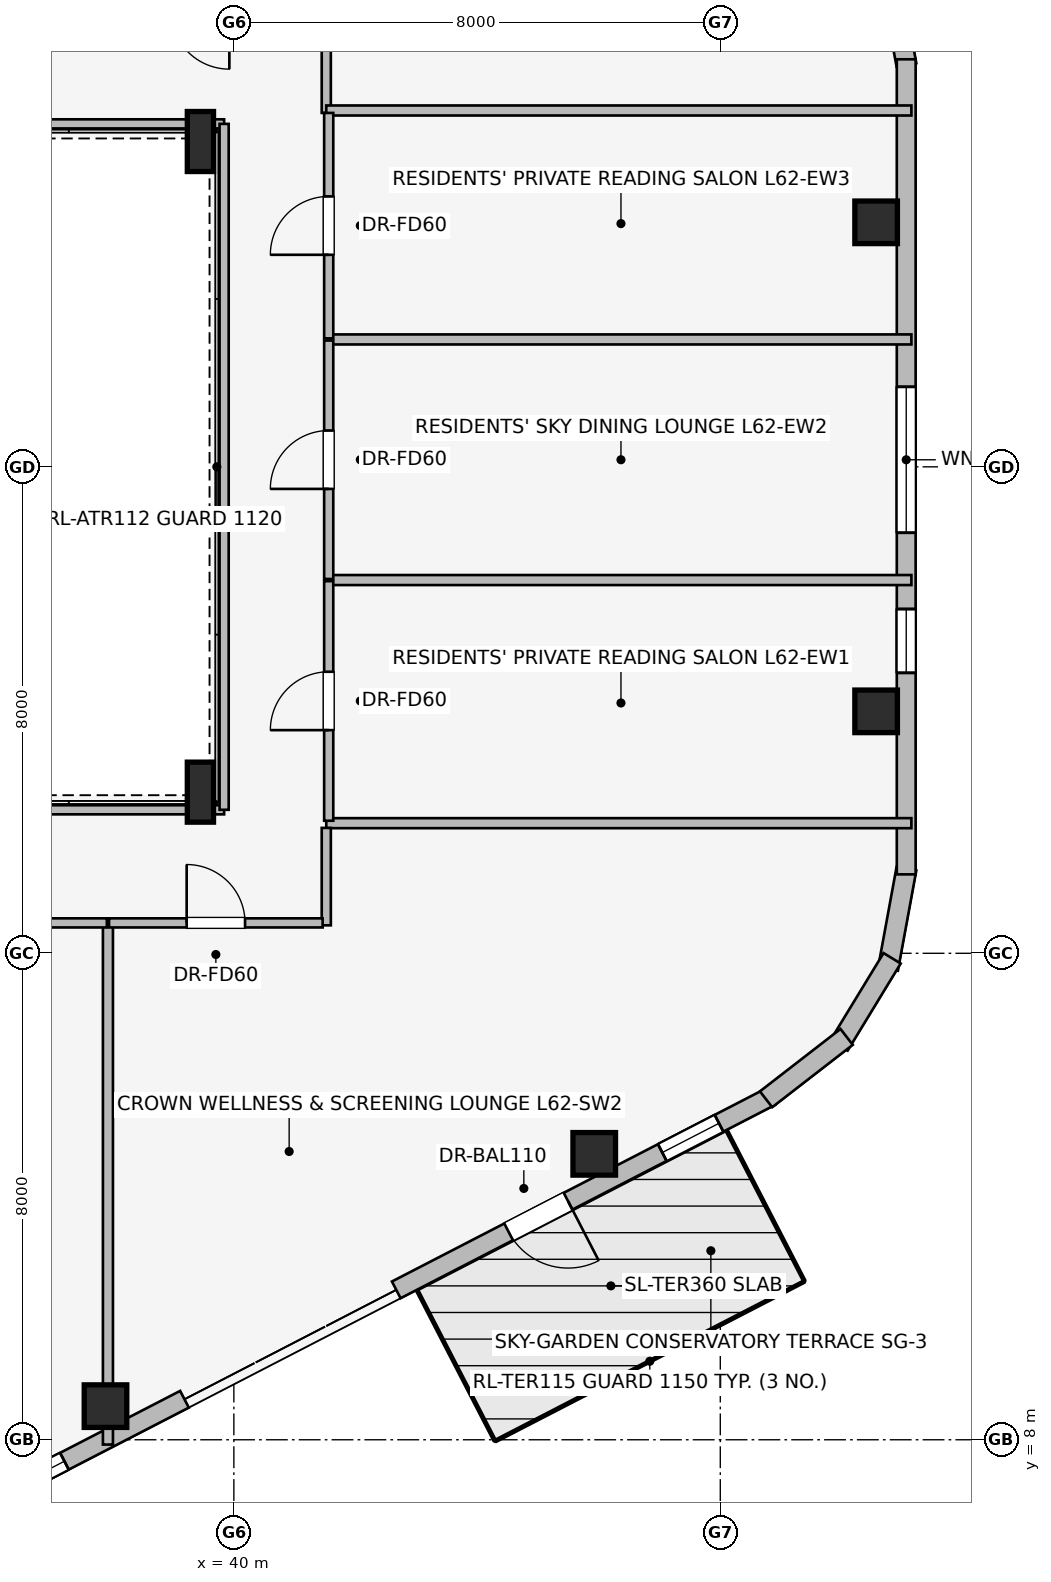
"""IFC4 building model, lengths in metres.
Left out: names, types, materials, properties, quantities, classifications, styles, units other than length and angle.
Written with IfcOpenShell. Run it as: python <this file> out.ifc"""

import sys

from ifc_helpers import new_model, si_unit, direction, frame, frame_2d, origin, origin_2d, place, context, subcontext, project, spatial, rectangle, i_section, extrude, element, fill, save


model = new_model("IFC4")
c1 = context("Model", 3, precision=1e-05, world=origin(), true_north=direction((0.0, 1.0)))
c2 = subcontext(c1, "Body", "Model", "MODEL_VIEW")
j1 = project(units=[si_unit("LENGTHUNIT", "METRE"), si_unit("PLANEANGLEUNIT", "RADIAN")], contexts=[c1])
p1 = place(None, origin())
s1 = spatial("IfcSite", under=j1, at=p1, CompositionType="ELEMENT")
p2 = place(p1, origin())
s2 = spatial("IfcBuilding", under=s1, at=p2, CompositionType="ELEMENT")
p3 = place(p2, frame((0.0, 0.0, 227.7)))
s3 = spatial("IfcBuildingStorey", under=s2, at=p3, CompositionType="ELEMENT", Elevation=227.7)
for number, where, z_axis, x_axis in (
    (1, (37.889, 8.553, 0.0), (0.0, 0.0, 1.0), (1.0, 0.0, 0.0)),
    (2, (45.927, 12.702, 0.0), (0.0, 0.0, 1.0), (1.0, 0.0, 0.0)),
    (3, (50.563, 19.979, 0.0), (0.0, 0.0, 1.0), (1.0, 0.0, 0.0)),
    (4, (50.563, 28.021, 0.0), (0.0, 0.0, 1.0), (1.0, 0.0, 0.0)),
):
    element("IfcColumn", number, at=place(p3, frame(where, z_axis=z_axis, x_axis=x_axis)), inside=s3, PredefinedType="COLUMN", context=c2, shape_type="SweptSolid", body=[
        extrude(rectangle(XDim=0.7, YDim=0.7, at=origin_2d()), origin(), (0.0, 0.0, 1.0), 3.55),
    ])
for number, where, z_axis, x_axis in (
    (5, (39.45, 18.65, 0.0), (0.0, 0.0, 1.0), (1.0, 0.0, 0.0)),
    (6, (39.45, 29.35, 0.0), (0.0, 0.0, 1.0), (1.0, 0.0, 0.0)),
):
    element("IfcColumn", number, at=place(p3, frame(where, z_axis=z_axis, x_axis=x_axis)), inside=s3, PredefinedType="COLUMN", context=c2, shape_type="SweptSolid", body=[
        extrude(i_section(OverallWidth=0.431, OverallDepth=0.987, WebThickness=0.034, FlangeThickness=0.062, at=origin_2d()), origin(), (0.0, 0.0, 1.0), 3.55),
    ])
p4 = place(p3, frame((50.759, 32.257, 0.0), z_axis=(0.0, 0.0, 1.0), x_axis=(0.180691763044, -0.983539773862, 0.0)))
e7 = element("IfcWall", 7, at=p4, inside=s3, PredefinedType="STANDARD", context=c2, shape_type="SweptSolid", body=[
    extrude(rectangle(XDim=1.677, YDim=0.33, at=frame_2d((0.838, 0.0))), origin(), (0.0, 0.0, 1.0), 3.29),
])
p5 = place(p3, frame((48.834, 13.646, 0.0), z_axis=(0.0, 0.0, 1.0), x_axis=(-0.888622971019, -0.458638436437, 0.0)))
e8 = element("IfcWall", 8, at=p5, inside=s3, PredefinedType="STANDARD", context=c2, shape_type="SweptSolid", body=[
    extrude(rectangle(XDim=6.936, YDim=0.31, at=frame_2d((3.468, 0.0))), origin(), (0.0, 0.0, 1.0), 3.29),
])
p6 = place(p5, frame((3.756, 0.0, 0.0)))
e9 = element("IfcOpeningElement", 9, at=p6, cuts=e8, PredefinedType="OPENING", context=c2, shape_type="SweptSolid", body=[
    extrude(rectangle(XDim=1.1, YDim=2.04, at=frame_2d((0.55, 1.02))), frame((0.0, 0.165, 0.0), z_axis=(0.0, -1.0, 0.0), x_axis=(1.0, 0.0, 0.0)), (0.0, 0.0, 1.0), 0.33),
])
p7 = place(p5, frame((0.962, 0.0, 0.75)))
e10 = element("IfcOpeningElement", 10, at=p7, cuts=e8, PredefinedType="OPENING", context=c2, shape_type="SweptSolid", body=[
    extrude(rectangle(XDim=1.05, YDim=1.4, at=frame_2d((0.525, 0.7))), frame((0.0, 0.165, 0.0), z_axis=(0.0, -1.0, 0.0), x_axis=(1.0, 0.0, 0.0)), (0.0, 0.0, 1.0), 0.33),
])
p8 = place(p3, frame((39.188, 8.666, 0.0), z_axis=(0.0, 0.0, 1.0), x_axis=(-0.888616094641, -0.45865175934, 0.0)))
e11 = element("IfcWall", 11, at=p8, inside=s3, PredefinedType="STANDARD", context=c2, shape_type="SweptSolid", body=[
    extrude(rectangle(XDim=4.221, YDim=0.31, at=frame_2d((2.111, 0.0))), origin(), (0.0, 0.0, 1.0), 3.29),
])
p9 = place(p8, frame((2.222, 0.0, 0.75)))
e12 = element("IfcOpeningElement", 12, at=p9, cuts=e11, PredefinedType="OPENING", context=c2, shape_type="SweptSolid", body=[
    extrude(rectangle(XDim=1.05, YDim=1.4, at=frame_2d((0.525, 0.7))), frame((0.0, 0.165, 0.0), z_axis=(0.0, -1.0, 0.0), x_axis=(1.0, 0.0, 0.0)), (0.0, 0.0, 1.0), 0.33),
])
p10 = place(p3, frame((51.062, 17.392, 0.0), z_axis=(0.0, 0.0, 1.0), x_axis=(-0.180691763044, -0.983539773862, 0.0)))
e13 = element("IfcWall", 13, at=p10, inside=s3, PredefinedType="STANDARD", context=c2, shape_type="SweptSolid", body=[
    extrude(rectangle(XDim=1.677, YDim=0.33, at=frame_2d((0.838, 0.0))), origin(), (0.0, 0.0, 1.0), 3.29),
])
p11 = place(p3, frame((50.826, 15.918, 0.0), z_axis=(0.0, 0.0, 1.0), x_axis=(-0.520325409202, -0.853968072318, 0.0)))
e14 = element("IfcWall", 14, at=p11, inside=s3, PredefinedType="STANDARD", context=c2, shape_type="SweptSolid", body=[
    extrude(rectangle(XDim=1.678, YDim=0.33, at=frame_2d((0.839, 0.0))), origin(), (0.0, 0.0, 1.0), 3.29),
])
p12 = place(p3, frame((50.078, 14.625, 0.0), z_axis=(0.0, 0.0, 1.0), x_axis=(-0.790691856293, -0.61221433207, 0.0)))
e15 = element("IfcWall", 15, at=p12, inside=s3, PredefinedType="STANDARD", context=c2, shape_type="SweptSolid", body=[
    extrude(rectangle(XDim=1.676, YDim=0.33, at=frame_2d((0.838, 0.0))), origin(), (0.0, 0.0, 1.0), 3.29),
])
p13 = place(p3, frame((51.058, 30.702, 0.0), z_axis=(0.0, 0.0, 1.0), x_axis=(0.0, -1.0, 0.0)))
e16 = element("IfcWall", 16, at=p13, inside=s3, PredefinedType="STANDARD", context=c2, shape_type="SweptSolid", body=[
    extrude(rectangle(XDim=13.404, YDim=0.31, at=frame_2d((6.702, 0.0))), origin(), (0.0, 0.0, 1.0), 3.29),
])
p14 = place(p13, frame((5.386, 0.0, 0.75)))
e17 = element("IfcOpeningElement", 17, at=p14, cuts=e16, PredefinedType="OPENING", context=c2, shape_type="SweptSolid", body=[
    extrude(rectangle(XDim=2.4, YDim=1.6, at=frame_2d((1.2, 0.8))), frame((0.0, 0.165, 0.0), z_axis=(0.0, -1.0, 0.0), x_axis=(1.0, 0.0, 0.0)), (0.0, 0.0, 1.0), 0.33),
])
p15 = place(p13, frame((9.04, 0.0, 0.75)))
e18 = element("IfcOpeningElement", 18, at=p15, cuts=e16, PredefinedType="OPENING", context=c2, shape_type="SweptSolid", body=[
    extrude(rectangle(XDim=1.05, YDim=1.4, at=frame_2d((0.525, 0.7))), frame((0.0, 0.165, 0.0), z_axis=(0.0, -1.0, 0.0), x_axis=(1.0, 0.0, 0.0)), (0.0, 0.0, 1.0), 0.33),
])
p16 = place(p3, frame((27.675, 18.36, 0.0), z_axis=(0.0, 0.0, 1.0), x_axis=(1.0, 0.0, 0.0)))
e19 = element("IfcWall", 19, at=p16, inside=s3, PredefinedType="PARTITIONING", context=c2, shape_type="SweptSolid", body=[
    extrude(rectangle(XDim=12.165, YDim=0.15, at=frame_2d((6.083, 0.0))), origin(), (0.0, 0.0, 1.0), 2.431),
])
p17 = place(p3, frame((39.84, 29.64, 0.0), z_axis=(0.0, 0.0, 1.0), x_axis=(-1.0, 0.0, 0.0)))
e20 = element("IfcWall", 20, at=p17, inside=s3, PredefinedType="PARTITIONING", context=c2, shape_type="SweptSolid", body=[
    extrude(rectangle(XDim=12.203, YDim=0.15, at=frame_2d((6.102, 0.0))), origin(), (0.0, 0.0, 1.0), 2.431),
])
p18 = place(p3, frame((39.84, 18.36, 0.0), z_axis=(0.0, 0.0, 1.0), x_axis=(0.0, 1.0, 0.0)))
e21 = element("IfcWall", 21, at=p18, inside=s3, PredefinedType="PARTITIONING", context=c2, shape_type="SweptSolid", body=[
    extrude(rectangle(XDim=11.28, YDim=0.15, at=frame_2d((5.64, 0.0))), origin(), (0.0, 0.0, 1.0), 3.29),
])
p19 = place(p3, frame((41.52, 29.82, 0.0), z_axis=(0.0, 0.0, 1.0), x_axis=(0.0, 1.0, 0.0)))
e22 = element("IfcWall", 22, at=p19, inside=s3, PredefinedType="PARTITIONING", context=c2, shape_type="SweptSolid", body=[
    extrude(rectangle(XDim=1.72, YDim=0.15, at=frame_2d((0.86, 0.0))), origin(), (0.0, 0.0, 1.0), 3.29),
])
for number, where, z_axis, x_axis in (
    (23, (41.52, 18.14, 0.0), (0.0, 0.0, 1.0), (1.0, 0.0, 0.0)),
    (24, (41.52, 29.86, 0.0), (0.0, 0.0, 1.0), (1.0, 0.0, 0.0)),
):
    element("IfcWall", number, at=place(p3, frame(where, z_axis=z_axis, x_axis=x_axis)), inside=s3, PredefinedType="PARTITIONING", context=c2, shape_type="SweptSolid", body=[
        extrude(rectangle(XDim=9.623, YDim=0.165, at=frame_2d((4.812, 0.0))), origin(), (0.0, 0.0, 1.0), 3.29),
    ])
for number, where, z_axis, x_axis in (
    (25, (41.59, 22.138, 0.0), (0.0, 0.0, 1.0), (1.0, 0.0, 0.0)),
    (26, (41.59, 26.095, 0.0), (0.0, 0.0, 1.0), (1.0, 0.0, 0.0)),
):
    element("IfcWall", number, at=place(p3, frame(where, z_axis=z_axis, x_axis=x_axis)), inside=s3, PredefinedType="PARTITIONING", context=c2, shape_type="SweptSolid", body=[
        extrude(rectangle(XDim=9.553, YDim=0.165, at=frame_2d((4.776, 0.0))), origin(), (0.0, 0.0, 1.0), 3.29),
    ])
p20 = place(p3, frame((41.56, 18.18, 0.0), z_axis=(0.0, 0.0, 1.0), x_axis=(0.0, 1.0, 0.0)))
e27 = element("IfcWall", 27, at=p20, inside=s3, PredefinedType="PARTITIONING", context=c2, shape_type="SweptSolid", body=[
    extrude(rectangle(XDim=3.94, YDim=0.15, at=frame_2d((1.97, 0.0))), origin(), (0.0, 0.0, 1.0), 3.29),
])
p21 = place(p20, frame((1.49, 0.0, 0.0)))
e28 = element("IfcOpeningElement", 28, at=p21, cuts=e27, PredefinedType="OPENING", context=c2, shape_type="SweptSolid", body=[
    extrude(rectangle(XDim=0.96, YDim=2.0, at=frame_2d((0.48, 1.0))), frame((0.0, 0.085, 0.0), z_axis=(0.0, -1.0, 0.0), x_axis=(1.0, 0.0, 0.0)), (0.0, 0.0, 1.0), 0.17),
])
p22 = place(p3, frame((41.56, 22.156, 0.0), z_axis=(0.0, 0.0, 1.0), x_axis=(0.0, 1.0, 0.0)))
e29 = element("IfcWall", 29, at=p22, inside=s3, PredefinedType="PARTITIONING", context=c2, shape_type="SweptSolid", body=[
    extrude(rectangle(XDim=3.921, YDim=0.15, at=frame_2d((1.96, 0.0))), origin(), (0.0, 0.0, 1.0), 3.29),
])
p23 = place(p22, frame((1.481, 0.0, 0.0)))
e30 = element("IfcOpeningElement", 30, at=p23, cuts=e29, PredefinedType="OPENING", context=c2, shape_type="SweptSolid", body=[
    extrude(rectangle(XDim=0.96, YDim=2.0, at=frame_2d((0.48, 1.0))), frame((0.0, 0.085, 0.0), z_axis=(0.0, -1.0, 0.0), x_axis=(1.0, 0.0, 0.0)), (0.0, 0.0, 1.0), 0.17),
])
p24 = place(p3, frame((41.56, 26.113, 0.0), z_axis=(0.0, 0.0, 1.0), x_axis=(0.0, 1.0, 0.0)))
e31 = element("IfcWall", 31, at=p24, inside=s3, PredefinedType="PARTITIONING", context=c2, shape_type="SweptSolid", body=[
    extrude(rectangle(XDim=3.707, YDim=0.15, at=frame_2d((1.854, 0.0))), origin(), (0.0, 0.0, 1.0), 3.29),
])
p25 = place(p24, frame((1.374, 0.0, 0.0)))
e32 = element("IfcOpeningElement", 32, at=p25, cuts=e31, PredefinedType="OPENING", context=c2, shape_type="SweptSolid", body=[
    extrude(rectangle(XDim=0.96, YDim=2.0, at=frame_2d((0.48, 1.0))), frame((0.0, 0.085, 0.0), z_axis=(0.0, -1.0, 0.0), x_axis=(1.0, 0.0, 0.0)), (0.0, 0.0, 1.0), 0.17),
])
p26 = place(p3, frame((41.52, 16.46, 0.0), z_axis=(0.0, 0.0, 1.0), x_axis=(0.0, 1.0, 0.0)))
e33 = element("IfcWall", 33, at=p26, inside=s3, PredefinedType="PARTITIONING", context=c2, shape_type="SweptSolid", body=[
    extrude(rectangle(XDim=1.602, YDim=0.15, at=frame_2d((0.801, 0.0))), origin(), (0.0, 0.0, 1.0), 3.29),
])
p27 = place(p3, frame((37.929, 7.921, 0.0), z_axis=(0.0, 0.0, 1.0), x_axis=(0.0, 1.0, 0.0)))
e34 = element("IfcWall", 34, at=p27, inside=s3, PredefinedType="PARTITIONING", context=c2, shape_type="SweptSolid", body=[
    extrude(rectangle(XDim=8.549, YDim=0.165, at=frame_2d((4.274, 0.0))), origin(), (0.0, 0.0, 1.0), 2.679),
])
p28 = place(p3, frame((32.85, 16.5, 0.0), z_axis=(0.0, 0.0, 1.0), x_axis=(1.0, 0.0, 0.0)))
e35 = element("IfcWall", 35, at=p28, inside=s3, PredefinedType="PARTITIONING", context=c2, shape_type="SweptSolid", body=[
    extrude(rectangle(XDim=5.061, YDim=0.15, at=frame_2d((2.53, 0.0))), origin(), (0.0, 0.0, 1.0), 3.29),
])
p29 = place(p28, frame((2.051, 0.0, 0.0)))
e36 = element("IfcOpeningElement", 36, at=p29, cuts=e35, PredefinedType="OPENING", context=c2, shape_type="SweptSolid", body=[
    extrude(rectangle(XDim=0.96, YDim=2.0, at=frame_2d((0.48, 1.0))), frame((0.0, 0.085, 0.0), z_axis=(0.0, -1.0, 0.0), x_axis=(1.0, 0.0, 0.0)), (0.0, 0.0, 1.0), 0.17),
])
p30 = place(p3, frame((37.947, 16.5, 0.0), z_axis=(0.0, 0.0, 1.0), x_axis=(1.0, 0.0, 0.0)))
e37 = element("IfcWall", 37, at=p30, inside=s3, PredefinedType="PARTITIONING", context=c2, shape_type="SweptSolid", body=[
    extrude(rectangle(XDim=3.513, YDim=0.15, at=frame_2d((1.756, 0.0))), origin(), (0.0, 0.0, 1.0), 3.29),
])
p31 = place(p30, frame((1.277, 0.0, 0.0)))
e38 = element("IfcOpeningElement", 38, at=p31, cuts=e37, PredefinedType="OPENING", context=c2, shape_type="SweptSolid", body=[
    extrude(rectangle(XDim=0.96, YDim=2.0, at=frame_2d((0.48, 1.0))), frame((0.0, 0.085, 0.0), z_axis=(0.0, -1.0, 0.0), x_axis=(1.0, 0.0, 0.0)), (0.0, 0.0, 1.0), 0.17),
])
p32 = place(p6, origin())
e39 = element("IfcDoor", 39, at=p32, inside=s3, OperationType="SINGLE_SWING_LEFT", PredefinedType="DOOR", context=c2, shape_type="SweptSolid", body=[
    extrude(rectangle(XDim=1.1, YDim=2.04, at=frame_2d((0.55, 1.02))), frame((0.0, 0.025, 0.0), z_axis=(0.0, -1.0, 0.0), x_axis=(1.0, 0.0, 0.0)), (0.0, 0.0, 1.0), 0.05),
])
fill(e9, e39)
p33 = place(p7, origin())
e40 = element("IfcWindow", 40, at=p33, inside=s3, PartitioningType="SINGLE_PANEL", PredefinedType="WINDOW", context=c2, shape_type="SweptSolid", body=[
    extrude(rectangle(XDim=1.05, YDim=1.4, at=frame_2d((0.525, 0.7))), frame((0.0, 0.03, 0.0), z_axis=(0.0, -1.0, 0.0), x_axis=(1.0, 0.0, 0.0)), (0.0, 0.0, 1.0), 0.06),
])
fill(e10, e40)
p34 = place(p9, origin())
e41 = element("IfcWindow", 41, at=p34, inside=s3, PartitioningType="SINGLE_PANEL", PredefinedType="WINDOW", context=c2, shape_type="SweptSolid", body=[
    extrude(rectangle(XDim=1.05, YDim=1.4, at=frame_2d((0.525, 0.7))), frame((0.0, 0.03, 0.0), z_axis=(0.0, -1.0, 0.0), x_axis=(1.0, 0.0, 0.0)), (0.0, 0.0, 1.0), 0.06),
])
fill(e12, e41)
p35 = place(p14, origin())
e42 = element("IfcWindow", 42, at=p35, inside=s3, PartitioningType="SINGLE_PANEL", PredefinedType="WINDOW", context=c2, shape_type="SweptSolid", body=[
    extrude(rectangle(XDim=2.4, YDim=1.6, at=frame_2d((1.2, 0.8))), frame((0.0, 0.03, 0.0), z_axis=(0.0, -1.0, 0.0), x_axis=(1.0, 0.0, 0.0)), (0.0, 0.0, 1.0), 0.06),
])
fill(e17, e42)
p36 = place(p15, origin())
e43 = element("IfcWindow", 43, at=p36, inside=s3, PartitioningType="SINGLE_PANEL", PredefinedType="WINDOW", context=c2, shape_type="SweptSolid", body=[
    extrude(rectangle(XDim=1.05, YDim=1.4, at=frame_2d((0.525, 0.7))), frame((0.0, 0.03, 0.0), z_axis=(0.0, -1.0, 0.0), x_axis=(1.0, 0.0, 0.0)), (0.0, 0.0, 1.0), 0.06),
])
fill(e18, e43)
p37 = place(p21, origin())
e44 = element("IfcDoor", 44, at=p37, inside=s3, OperationType="SINGLE_SWING_LEFT", PredefinedType="DOOR", context=c2, shape_type="SweptSolid", body=[
    extrude(rectangle(XDim=0.96, YDim=2.0, at=frame_2d((0.48, 1.0))), frame((0.0, 0.025, 0.0), z_axis=(0.0, -1.0, 0.0), x_axis=(1.0, 0.0, 0.0)), (0.0, 0.0, 1.0), 0.05),
])
fill(e28, e44)
p38 = place(p23, origin())
e45 = element("IfcDoor", 45, at=p38, inside=s3, OperationType="SINGLE_SWING_LEFT", PredefinedType="DOOR", context=c2, shape_type="SweptSolid", body=[
    extrude(rectangle(XDim=0.96, YDim=2.0, at=frame_2d((0.48, 1.0))), frame((0.0, 0.025, 0.0), z_axis=(0.0, -1.0, 0.0), x_axis=(1.0, 0.0, 0.0)), (0.0, 0.0, 1.0), 0.05),
])
fill(e30, e45)
p39 = place(p25, origin())
e46 = element("IfcDoor", 46, at=p39, inside=s3, OperationType="SINGLE_SWING_LEFT", PredefinedType="DOOR", context=c2, shape_type="SweptSolid", body=[
    extrude(rectangle(XDim=0.96, YDim=2.0, at=frame_2d((0.48, 1.0))), frame((0.0, 0.025, 0.0), z_axis=(0.0, -1.0, 0.0), x_axis=(1.0, 0.0, 0.0)), (0.0, 0.0, 1.0), 0.05),
])
fill(e32, e46)
p40 = place(p31, origin())
e47 = element("IfcDoor", 47, at=p40, inside=s3, OperationType="SINGLE_SWING_LEFT", PredefinedType="DOOR", context=c2, shape_type="SweptSolid", body=[
    extrude(rectangle(XDim=0.96, YDim=2.0, at=frame_2d((0.48, 1.0))), frame((0.0, 0.025, 0.0), z_axis=(0.0, -1.0, 0.0), x_axis=(1.0, 0.0, 0.0)), (0.0, 0.0, 1.0), 0.05),
])
fill(e38, e47)
save(model, sys.argv[1])
